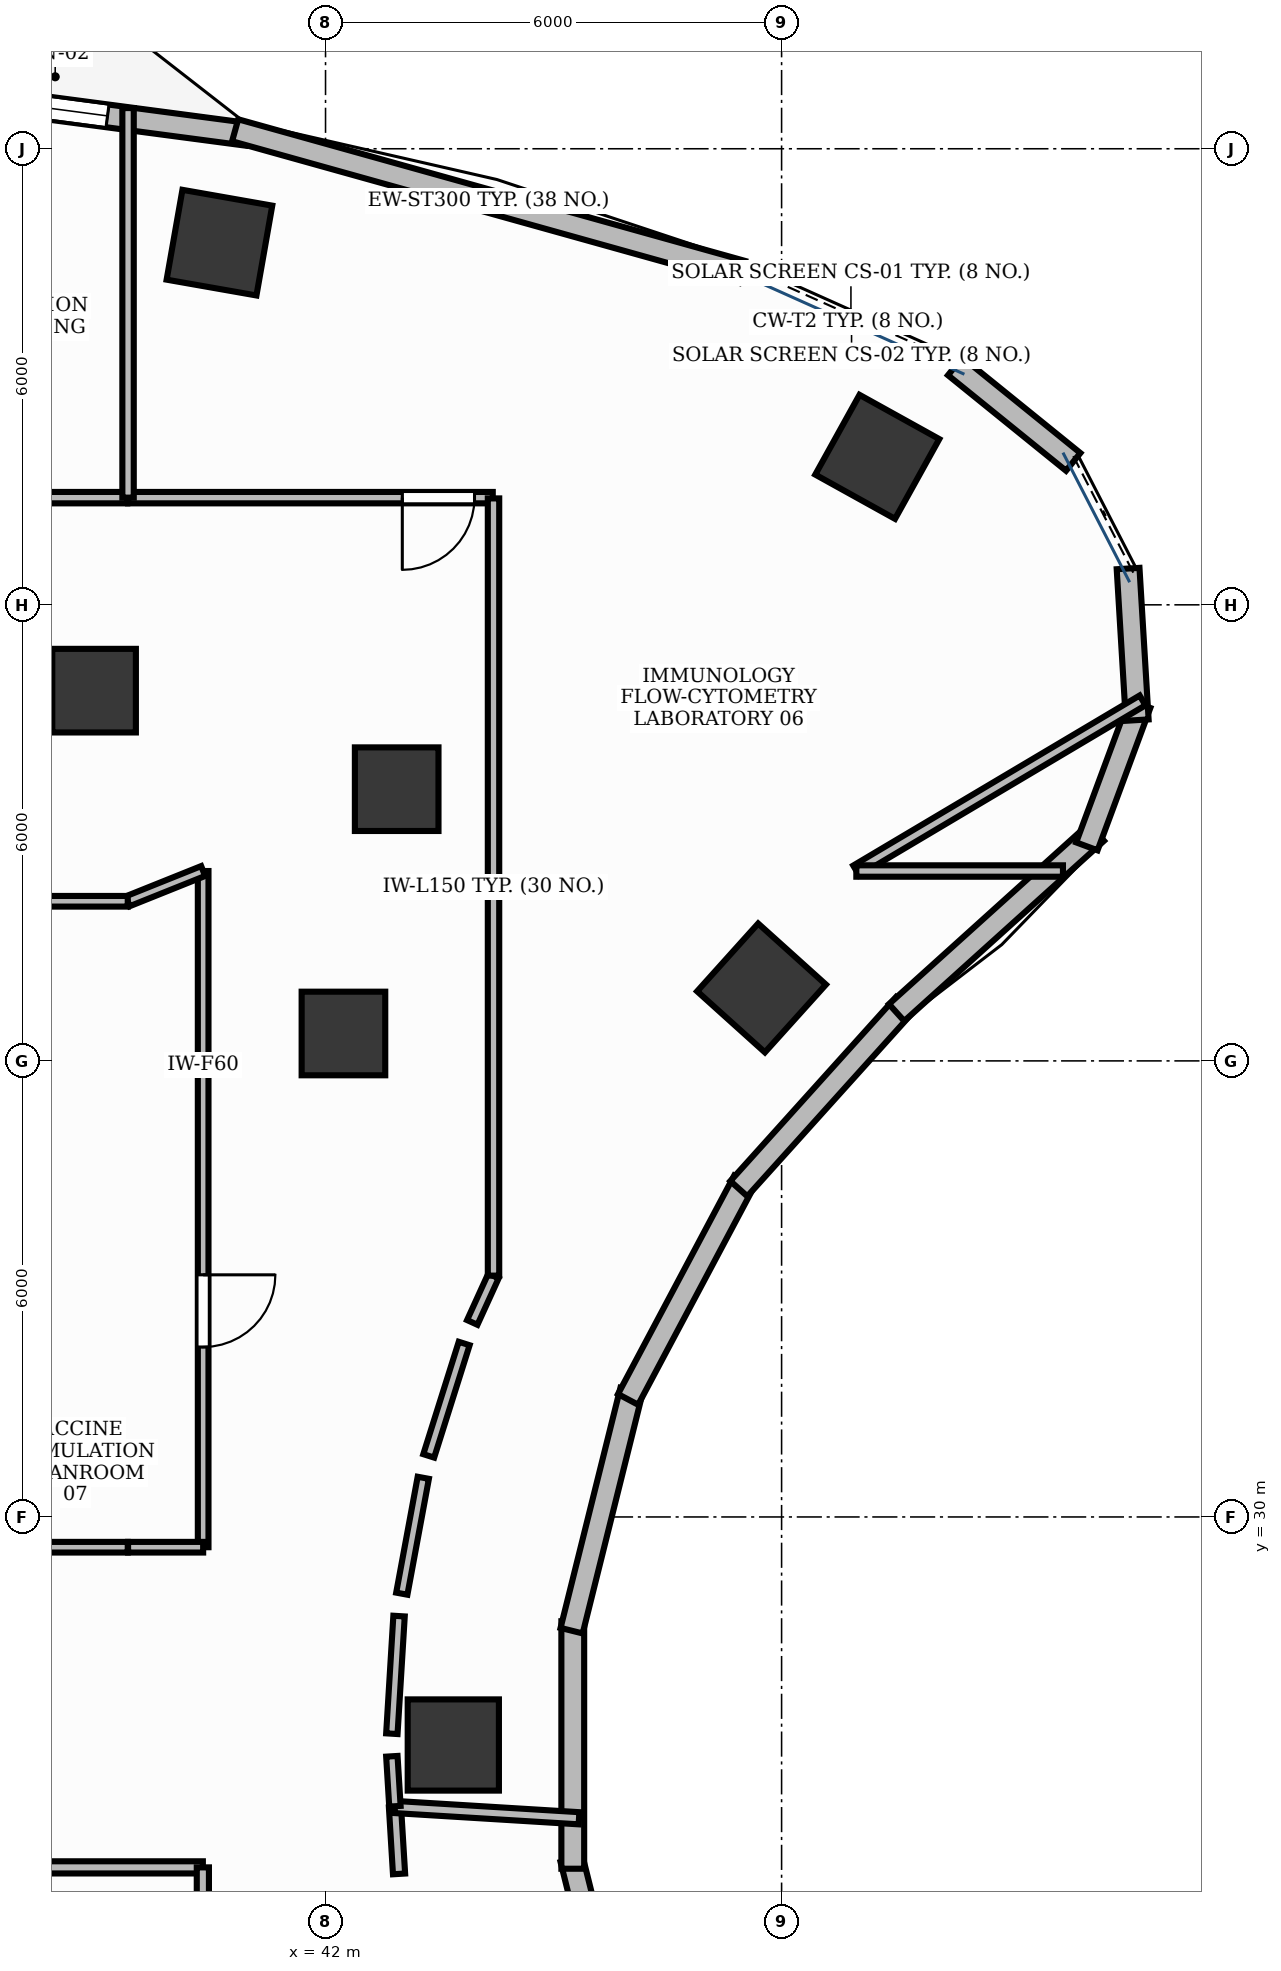
"""IFC4 building model, lengths in metres.
Left out: names, types, materials, properties, quantities, classifications, styles, units other than length and angle.
Written with IfcOpenShell. Run it as: python <this file> out.ifc"""

import sys

from ifc_helpers import new_model, si_unit, direction, frame, frame_2d, origin, origin_2d, place, context, subcontext, project, spatial, rectangle, extrude, element, fill, save


model = new_model("IFC4")
c1 = context("Model", 3, precision=1e-05, world=origin(), true_north=direction((0.0, 1.0)))
c2 = subcontext(c1, "Body", "Model", "MODEL_VIEW")
j1 = project(units=[si_unit("LENGTHUNIT", "METRE"), si_unit("PLANEANGLEUNIT", "RADIAN")], contexts=[c1])
p1 = place(None, origin())
s1 = spatial("IfcSite", under=j1, at=p1, CompositionType="ELEMENT")
p2 = place(p1, origin())
s2 = spatial("IfcBuilding", under=s1, at=p2, CompositionType="ELEMENT")
p3 = place(p2, frame((0.0, 0.0, 98.4)))
s3 = spatial("IfcBuildingStorey", under=s2, at=p3, CompositionType="ELEMENT", Elevation=98.4)
p4 = place(p3, frame((49.259, 43.947, -0.0), z_axis=(0.0, 0.0, 1.0), x_axis=(-0.874535078577, 0.484962262797, 0.0)))
e1 = element("IfcColumn", 1, at=p4, inside=s3, PredefinedType="COLUMN", context=c2, shape_type="SweptSolid", body=[
    extrude(rectangle(XDim=1.2, YDim=1.2, at=origin_2d()), origin(), (0.0, 0.0, 1.0), 3.901),
])
p5 = place(p3, frame((42.936, 39.575, -0.0), z_axis=(0.0, 0.0, 1.0), x_axis=(1.0, 0.0, 0.0)))
e2 = element("IfcColumn", 2, at=p5, inside=s3, PredefinedType="COLUMN", context=c2, shape_type="SweptSolid", body=[
    extrude(rectangle(XDim=1.1, YDim=1.1, at=origin_2d()), origin(), (0.0, 0.0, 1.0), 3.901),
])
p6 = place(p3, frame((40.604, 46.765, -0.0), z_axis=(0.0, 0.0, 1.0), x_axis=(-0.984868307662, 0.173304404339, 0.0)))
e3 = element("IfcColumn", 3, at=p6, inside=s3, PredefinedType="COLUMN", context=c2, shape_type="SweptSolid", body=[
    extrude(rectangle(XDim=1.2, YDim=1.2, at=origin_2d()), origin(), (0.0, 0.0, 1.0), 3.901),
])
p7 = place(p3, frame((38.955, 40.871, -0.0), z_axis=(0.0, 0.0, 1.0), x_axis=(1.0, 0.0, 0.0)))
e4 = element("IfcColumn", 4, at=p7, inside=s3, PredefinedType="COLUMN", context=c2, shape_type="SweptSolid", body=[
    extrude(rectangle(XDim=1.1, YDim=1.1, at=origin_2d()), origin(), (0.0, 0.0, 1.0), 3.901),
])
for number, where, z_axis, x_axis in (
    (5, (43.681, 27.0, -0.0), (0.0, 0.0, 1.0), (0.0, 1.0, 0.0)),
    (6, (47.736, 36.96, -0.0), (0.0, 0.0, 1.0), (0.669, 0.743, 0.0)),
):
    element("IfcColumn", number, at=place(p3, frame(where, z_axis=z_axis, x_axis=x_axis)), inside=s3, PredefinedType="COLUMN", context=c2, shape_type="SweptSolid", body=[
        extrude(rectangle(XDim=1.2, YDim=1.2, at=origin_2d()), origin(), (0.0, 0.0, 1.0), 3.901),
    ])
p8 = place(p3, frame((42.236, 36.361, -0.0), z_axis=(0.0, 0.0, 1.0), x_axis=(1.0, 0.0, 0.0)))
e7 = element("IfcColumn", 7, at=p8, inside=s3, PredefinedType="COLUMN", context=c2, shape_type="SweptSolid", body=[
    extrude(rectangle(XDim=1.1, YDim=1.1, at=origin_2d()), origin(), (0.0, 0.0, 1.0), 3.901),
])
p9 = place(p3, frame((40.964, 48.19, 0.0), z_axis=(0.0, 0.0, 1.0), x_axis=(-0.991369257822, 0.131099178664, 0.0)))
e8 = element("IfcWall", 8, at=p9, inside=s3, PredefinedType="STANDARD", context=c2, shape_type="SweptSolid", body=[
    extrude(rectangle(XDim=3.575, YDim=0.3, at=frame_2d((1.788, 0.0))), origin(), (0.0, 0.0, 1.0), 3.9),
])
p10 = place(p9, frame((1.848, 0.0, 0.95)))
e9 = element("IfcOpeningElement", 9, at=p10, cuts=e8, PredefinedType="OPENING", context=c2, shape_type="SweptSolid", body=[
    extrude(rectangle(XDim=1.5, YDim=1.8, at=frame_2d((0.75, 0.9))), frame((0.0, 0.165, 0.0), z_axis=(0.0, -1.0, 0.0), x_axis=(1.0, 0.0, 0.0)), (0.0, 0.0, 1.0), 0.33),
])
p11 = place(p3, frame((47.479, 46.38, 0.0), z_axis=(0.0, 0.0, 1.0), x_axis=(-0.963116215402, 0.269085777459, 0.0)))
e10 = element("IfcWall", 10, at=p11, inside=s3, PredefinedType="STANDARD", context=c2, shape_type="SweptSolid", body=[
    extrude(rectangle(XDim=6.924, YDim=0.3, at=frame_2d((3.462, 0.0))), origin(), (0.0, 0.0, 1.0), 3.9),
])
p12 = place(p3, frame((46.025, 22.337, 0.0), z_axis=(0.0, 0.0, 1.0), x_axis=(-0.241900409149, 0.970301083197, 0.0)))
e11 = element("IfcWall", 11, at=p12, inside=s3, PredefinedType="STANDARD", context=c2, shape_type="SweptSolid", body=[
    extrude(rectangle(XDim=3.256, YDim=0.3, at=frame_2d((1.628, 0.0))), origin(), (0.0, 0.0, 1.0), 3.9),
])
p13 = place(p3, frame((45.253, 25.372, 0.0), z_axis=(0.0, 0.0, 1.0), x_axis=(0.0, 1.0, 0.0)))
e12 = element("IfcWall", 12, at=p13, inside=s3, PredefinedType="STANDARD", context=c2, shape_type="SweptSolid", body=[
    extrude(rectangle(XDim=3.255, YDim=0.3, at=frame_2d((1.628, 0.0))), origin(), (0.0, 0.0, 1.0), 3.9),
])
p14 = place(p3, frame((45.238, 28.504, 0.0), z_axis=(0.0, 0.0, 1.0), x_axis=(0.241900409149, 0.970301083197, 0.0)))
e13 = element("IfcWall", 13, at=p14, inside=s3, PredefinedType="STANDARD", context=c2, shape_type="SweptSolid", body=[
    extrude(rectangle(XDim=3.256, YDim=0.3, at=frame_2d((1.628, 0.0))), origin(), (0.0, 0.0, 1.0), 3.9),
])
p15 = place(p3, frame((45.98, 31.547, 0.0), z_axis=(0.0, 0.0, 1.0), x_axis=(0.469451284634, 0.882958374645, 0.0)))
e14 = element("IfcWall", 14, at=p15, inside=s3, PredefinedType="STANDARD", context=c2, shape_type="SweptSolid", body=[
    extrude(rectangle(XDim=3.256, YDim=0.3, at=frame_2d((1.628, 0.0))), origin(), (0.0, 0.0, 1.0), 3.9),
])
p16 = place(p3, frame((47.437, 34.319, 0.0), z_axis=(0.0, 0.0, 1.0), x_axis=(0.669167727967, 0.743111399353, 0.0)))
e15 = element("IfcWall", 15, at=p16, inside=s3, PredefinedType="STANDARD", context=c2, shape_type="SweptSolid", body=[
    extrude(rectangle(XDim=3.255, YDim=0.3, at=frame_2d((1.628, 0.0))), origin(), (0.0, 0.0, 1.0), 3.9),
])
p17 = place(p3, frame((49.513, 36.636, 0.0), z_axis=(0.0, 0.0, 1.0), x_axis=(0.74255963233, 0.669779958221, 0.0)))
e16 = element("IfcWall", 16, at=p17, inside=s3, PredefinedType="STANDARD", context=c2, shape_type="SweptSolid", body=[
    extrude(rectangle(XDim=3.539, YDim=0.3, at=frame_2d((1.77, 0.0))), origin(), (0.0, 0.0, 1.0), 3.9),
])
p18 = place(p3, frame((52.016, 38.822, 0.0), z_axis=(0.0, 0.0, 1.0), x_axis=(0.347370087337, 0.937728117539, 0.0)))
e17 = element("IfcWall", 17, at=p18, inside=s3, PredefinedType="STANDARD", context=c2, shape_type="SweptSolid", body=[
    extrude(rectangle(XDim=1.997, YDim=0.3, at=frame_2d((0.999, 0.0))), origin(), (0.0, 0.0, 1.0), 3.9),
])
for number, where, z_axis, x_axis in (
    (18, (52.679, 40.483, 0.0), (0.0, 0.0, 1.0), (-0.06, 0.998, 0.0)),
    (19, (51.836, 43.881, 0.0), (0.0, 0.0, 1.0), (-0.777, 0.629, 0.0)),
):
    element("IfcWall", number, at=place(p3, frame(where, z_axis=z_axis, x_axis=x_axis)), inside=s3, PredefinedType="STANDARD", context=c2, shape_type="SweptSolid", body=[
        extrude(rectangle(XDim=1.998, YDim=0.3, at=frame_2d((0.999, 0.0))), origin(), (0.0, 0.0, 1.0), 3.9),
    ])
p19 = place(p3, frame((44.2, 43.41, 0.0), z_axis=(0.0, 0.0, 1.0), x_axis=(-1.0, 0.0, 0.0)))
e20 = element("IfcWall", 20, at=p19, inside=s3, PredefinedType="PARTITIONING", context=c2, shape_type="SweptSolid", body=[
    extrude(rectangle(XDim=4.798, YDim=0.15, at=frame_2d((2.399, 0.0))), origin(), (0.0, 0.0, 1.0), 2.91),
])
p20 = place(p19, frame((0.24, 0.0, 0.0)))
e21 = element("IfcOpeningElement", 21, at=p20, cuts=e20, PredefinedType="OPENING", context=c2, shape_type="SweptSolid", body=[
    extrude(rectangle(XDim=0.95, YDim=2.15, at=frame_2d((0.475, 1.075))), frame((0.0, 0.09, 0.0), z_axis=(0.0, -1.0, 0.0), x_axis=(1.0, 0.0, 0.0)), (0.0, 0.0, 1.0), 0.18),
])
p21 = place(p3, frame((40.39, 38.498, 0.0), z_axis=(0.0, 0.0, 1.0), x_axis=(0.0, -1.0, 0.0)))
e22 = element("IfcWall", 22, at=p21, inside=s3, PredefinedType="PARTITIONING", context=c2, shape_type="SweptSolid", body=[
    extrude(rectangle(XDim=8.896, YDim=0.14, at=frame_2d((4.448, 0.0))), origin(), (0.0, 0.0, 1.0), 2.91),
])
p22 = place(p21, frame((5.312, 0.0, 0.0)))
e23 = element("IfcOpeningElement", 23, at=p22, cuts=e22, PredefinedType="OPENING", context=c2, shape_type="SweptSolid", body=[
    extrude(rectangle(XDim=0.95, YDim=2.15, at=frame_2d((0.475, 1.075))), frame((0.0, 0.085, 0.0), z_axis=(0.0, -1.0, 0.0), x_axis=(1.0, 0.0, 0.0)), (0.0, 0.0, 1.0), 0.17),
])
p23 = place(p3, frame((39.392, 43.41, 0.0), z_axis=(0.0, 0.0, 1.0), x_axis=(-1.0, 0.0, 0.0)))
e24 = element("IfcWall", 24, at=p23, inside=s3, PredefinedType="PARTITIONING", context=c2, shape_type="SweptSolid", body=[
    extrude(rectangle(XDim=4.196, YDim=0.15, at=frame_2d((2.098, 0.0))), origin(), (0.0, 0.0, 1.0), 2.91),
])
p24 = place(p23, frame((2.748, 0.0, 0.0)))
e25 = element("IfcOpeningElement", 25, at=p24, cuts=e24, PredefinedType="OPENING", context=c2, shape_type="SweptSolid", body=[
    extrude(rectangle(XDim=0.95, YDim=2.15, at=frame_2d((0.475, 1.075))), frame((0.0, 0.09, 0.0), z_axis=(0.0, -1.0, 0.0), x_axis=(1.0, 0.0, 0.0)), (0.0, 0.0, 1.0), 0.18),
])
p25 = place(p3, frame((42.967, 25.304, 0.0), z_axis=(0.0, 0.0, 1.0), x_axis=(-0.061188874166, 0.998126205286, 0.0)))
e26 = element("IfcWall", 26, at=p25, inside=s3, PredefinedType="PARTITIONING", context=c2, shape_type="SweptSolid", body=[
    extrude(rectangle(XDim=0.882, YDim=0.16, at=frame_2d((0.441, 0.0))), origin(), (0.0, 0.0, 1.0), 2.91),
])
p26 = place(p3, frame((42.913, 26.184, 0.0), z_axis=(0.0, 0.0, 1.0), x_axis=(0.998138916893, -0.060981165807, 0.0)))
e27 = element("IfcWall", 27, at=p26, inside=s3, PredefinedType="PARTITIONING", context=c2, shape_type="SweptSolid", body=[
    extrude(rectangle(XDim=2.426, YDim=0.16, at=frame_2d((1.213, 0.0))), origin(), (0.0, 0.0, 1.0), 2.91),
])
p27 = place(p3, frame((37.36, 25.39, 0.0), z_axis=(0.0, 0.0, 1.0), x_axis=(1.0, 0.0, 0.0)))
e28 = element("IfcWall", 28, at=p27, inside=s3, PredefinedType="PARTITIONING", context=c2, shape_type="SweptSolid", body=[
    extrude(rectangle(XDim=3.026, YDim=0.16, at=frame_2d((1.513, 0.0))), origin(), (0.0, 0.0, 1.0), 2.91),
])
p28 = place(p3, frame((40.386, 25.39, 0.0), z_axis=(0.0, 0.0, 1.0), x_axis=(0.0, -1.0, 0.0)))
e29 = element("IfcWall", 29, at=p28, inside=s3, PredefinedType="PARTITIONING", context=c2, shape_type="SweptSolid", body=[
    extrude(rectangle(XDim=1.388, YDim=0.16, at=frame_2d((0.694, 0.0))), origin(), (0.0, 0.0, 1.0), 2.91),
])
p29 = place(p3, frame((52.749, 40.743, 0.0), z_axis=(0.0, 0.0, 1.0), x_axis=(-0.85982416837, -0.510590246173, 0.0)))
e30 = element("IfcWall", 30, at=p29, inside=s3, PredefinedType="PARTITIONING", context=c2, shape_type="SweptSolid", body=[
    extrude(rectangle(XDim=4.382, YDim=0.15, at=frame_2d((2.191, 0.0))), origin(), (0.0, 0.0, 1.0), 2.91),
])
p30 = place(p3, frame((48.983, 38.498, 0.0), z_axis=(0.0, 0.0, 1.0), x_axis=(1.0, 0.0, 0.0)))
e31 = element("IfcWall", 31, at=p30, inside=s3, PredefinedType="PARTITIONING", context=c2, shape_type="SweptSolid", body=[
    extrude(rectangle(XDim=2.719, YDim=0.15, at=frame_2d((1.359, 0.0))), origin(), (0.0, 0.0, 1.0), 2.91),
])
p31 = place(p3, frame((42.913, 26.194, 0.0), z_axis=(0.0, 0.0, 1.0), x_axis=(-0.061177910387, 0.998126877346, 0.0)))
e32 = element("IfcWall", 32, at=p31, inside=s3, PredefinedType="PARTITIONING", context=c2, shape_type="SweptSolid", body=[
    extrude(rectangle(XDim=0.658, YDim=0.15, at=frame_2d((0.329, 0.0))), origin(), (0.0, 0.0, 1.0), 2.91),
])
p32 = place(p3, frame((42.873, 27.149, 0.0), z_axis=(0.0, 0.0, 1.0), x_axis=(0.061103659378, 0.99813142562, 0.0)))
e33 = element("IfcWall", 33, at=p32, inside=s3, PredefinedType="PARTITIONING", context=c2, shape_type="SweptSolid", body=[
    extrude(rectangle(XDim=1.55, YDim=0.15, at=frame_2d((0.775, 0.0))), origin(), (0.0, 0.0, 1.0), 2.91),
])
p33 = place(p3, frame((43.003, 28.991, 0.0), z_axis=(0.0, 0.0, 1.0), x_axis=(0.182168192784, 0.983267384559, 0.0)))
e34 = element("IfcWall", 34, at=p33, inside=s3, PredefinedType="PARTITIONING", context=c2, shape_type="SweptSolid", body=[
    extrude(rectangle(XDim=1.551, YDim=0.15, at=frame_2d((0.775, 0.0))), origin(), (0.0, 0.0, 1.0), 2.91),
])
p34 = place(p3, frame((43.358, 30.803, 0.0), z_axis=(0.0, 0.0, 1.0), x_axis=(0.300641414783, 0.953737248783, 0.0)))
e35 = element("IfcWall", 35, at=p34, inside=s3, PredefinedType="PARTITIONING", context=c2, shape_type="SweptSolid", body=[
    extrude(rectangle(XDim=1.55, YDim=0.15, at=frame_2d((0.775, 0.0))), origin(), (0.0, 0.0, 1.0), 2.91),
])
p35 = place(p3, frame((43.93, 32.559, 0.0), z_axis=(0.0, 0.0, 1.0), x_axis=(0.414377467152, 0.910105111905, 0.0)))
e36 = element("IfcWall", 36, at=p35, inside=s3, PredefinedType="PARTITIONING", context=c2, shape_type="SweptSolid", body=[
    extrude(rectangle(XDim=0.672, YDim=0.15, at=frame_2d((0.336, 0.0))), origin(), (0.0, 0.0, 1.0), 2.91),
])
p36 = place(p3, frame((44.21, 33.175, 0.0), z_axis=(0.0, 0.0, 1.0), x_axis=(0.0, 1.0, 0.0)))
e37 = element("IfcWall", 37, at=p36, inside=s3, PredefinedType="PARTITIONING", context=c2, shape_type="SweptSolid", body=[
    extrude(rectangle(XDim=10.225, YDim=0.15, at=frame_2d((5.112, 0.0))), origin(), (0.0, 0.0, 1.0), 2.91),
])
p37 = place(p3, frame((39.402, 43.41, 0.0), z_axis=(0.0, 0.0, 1.0), x_axis=(0.0, 1.0, 0.0)))
e38 = element("IfcWall", 38, at=p37, inside=s3, PredefinedType="PARTITIONING", context=c2, shape_type="SweptSolid", body=[
    extrude(rectangle(XDim=5.125, YDim=0.15, at=frame_2d((2.563, 0.0))), origin(), (0.0, 0.0, 1.0), 2.91),
])
p38 = place(p3, frame((39.398, 38.1, 0.0), z_axis=(0.0, 0.0, 1.0), x_axis=(0.928098124006, 0.372335698284, 0.0)))
e39 = element("IfcWall", 39, at=p38, inside=s3, PredefinedType="PARTITIONING", context=c2, shape_type="SweptSolid", body=[
    extrude(rectangle(XDim=1.069, YDim=0.14, at=frame_2d((0.534, 0.0))), origin(), (0.0, 0.0, 1.0), 2.91),
])
p39 = place(p3, frame((40.39, 29.602, 0.0), z_axis=(0.0, 0.0, 1.0), x_axis=(-1.0, 0.0, 0.0)))
e40 = element("IfcWall", 40, at=p39, inside=s3, PredefinedType="PARTITIONING", context=c2, shape_type="SweptSolid", body=[
    extrude(rectangle(XDim=0.988, YDim=0.14, at=frame_2d((0.494, 0.0))), origin(), (0.0, 0.0, 1.0), 2.91),
])
p40 = place(p3, frame((39.398, 29.602, 0.0), z_axis=(0.0, 0.0, 1.0), x_axis=(-1.0, 0.0, 0.0)))
e41 = element("IfcWall", 41, at=p40, inside=s3, PredefinedType="PARTITIONING", context=c2, shape_type="SweptSolid", body=[
    extrude(rectangle(XDim=2.038, YDim=0.14, at=frame_2d((1.019, 0.0))), origin(), (0.0, 0.0, 1.0), 2.91),
])
p41 = place(p3, frame((37.21, 38.1, 0.0), z_axis=(0.0, 0.0, 1.0), x_axis=(1.0, 0.0, 0.0)))
e42 = element("IfcWall", 42, at=p41, inside=s3, PredefinedType="PARTITIONING", context=c2, shape_type="SweptSolid", body=[
    extrude(rectangle(XDim=2.188, YDim=0.14, at=frame_2d((1.094, 0.0))), origin(), (0.0, 0.0, 1.0), 2.91),
])
p42 = place(p10, origin())
e43 = element("IfcWindow", 43, at=p42, inside=s3, PartitioningType="DOUBLE_PANEL_VERTICAL", PredefinedType="WINDOW", context=c2, shape_type="SweptSolid", body=[
    extrude(rectangle(XDim=1.5, YDim=1.8, at=frame_2d((0.75, 0.9))), frame((0.0, 0.03, 0.0), z_axis=(0.0, -1.0, 0.0), x_axis=(1.0, 0.0, 0.0)), (0.0, 0.0, 1.0), 0.06),
])
fill(e9, e43)
p43 = place(p20, origin())
e44 = element("IfcDoor", 44, at=p43, inside=s3, OperationType="SINGLE_SWING_RIGHT", PredefinedType="DOOR", context=c2, shape_type="SweptSolid", body=[
    extrude(rectangle(XDim=0.95, YDim=2.15, at=frame_2d((0.475, 1.075))), frame((0.0, 0.025, 0.0), z_axis=(0.0, -1.0, 0.0), x_axis=(1.0, 0.0, 0.0)), (0.0, 0.0, 1.0), 0.05),
])
fill(e21, e44)
p44 = place(p22, origin())
e45 = element("IfcDoor", 45, at=p44, inside=s3, OperationType="SINGLE_SWING_LEFT", PredefinedType="DOOR", context=c2, shape_type="SweptSolid", body=[
    extrude(rectangle(XDim=0.95, YDim=2.15, at=frame_2d((0.475, 1.075))), frame((0.0, 0.025, 0.0), z_axis=(0.0, -1.0, 0.0), x_axis=(1.0, 0.0, 0.0)), (0.0, 0.0, 1.0), 0.05),
])
fill(e23, e45)
save(model, sys.argv[1])
